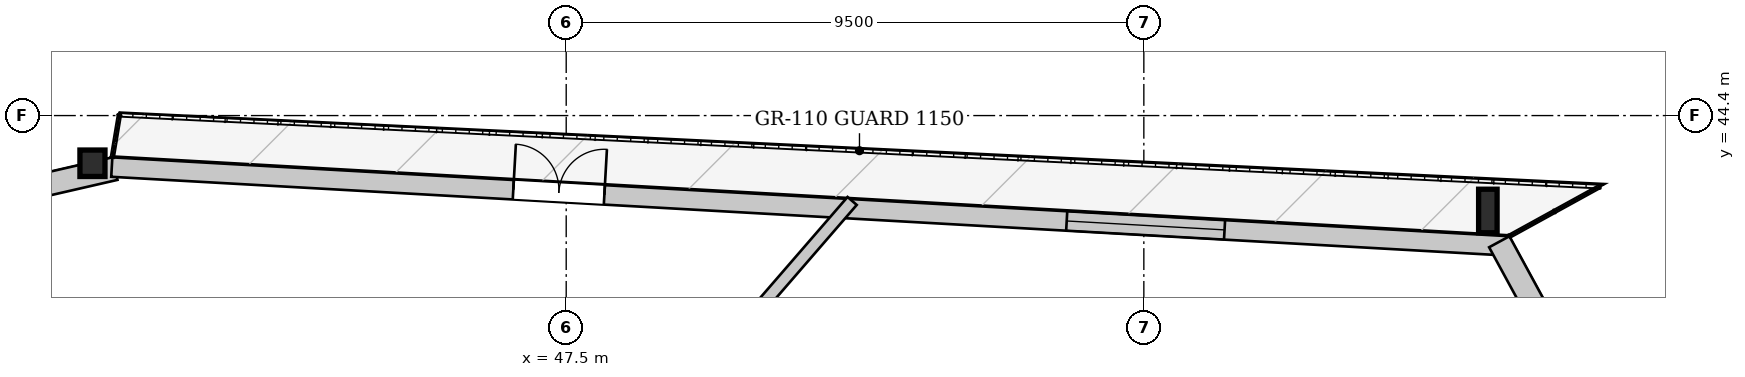
"""IFC4 building model, lengths in metres.
Left out: names, types, materials, properties, quantities, classifications, styles, units other than length and angle.
Written with IfcOpenShell. Run it as: python <this file> out.ifc"""

import sys

from ifc_helpers import new_model, si_unit, direction, frame, frame_2d, origin, origin_2d, place, context, subcontext, project, spatial, rectangle, i_section, extrude, source, transform, mapped, element, fill, save


model = new_model("IFC4")
c1 = context("Model", 3, precision=1e-05, world=origin(), true_north=direction((0.0, 1.0)))
c2 = subcontext(c1, "Body", "Model", "MODEL_VIEW")
j1 = project(units=[si_unit("LENGTHUNIT", "METRE"), si_unit("PLANEANGLEUNIT", "RADIAN")], contexts=[c1])
p1 = place(None, origin())
s1 = spatial("IfcSite", under=j1, at=p1, CompositionType="ELEMENT")
p2 = place(p1, origin())
s2 = spatial("IfcBuilding", under=s1, at=p2, CompositionType="ELEMENT")
p3 = place(p2, frame((0.0, 0.0, 157.25)))
s3 = spatial("IfcBuildingStorey", under=s2, at=p3, CompositionType="ELEMENT", Elevation=157.25)
m1 = source(origin(), c2, "Body", "SweptSolid", [
    extrude(i_section(OverallWidth=0.304, OverallDepth=0.716, WebThickness=0.021, FlangeThickness=0.04, at=origin_2d()), origin(), (0.0, 0.0, 1.0), 3.557),
])
p4 = place(p3, frame((63.012, 42.416, 0.0), z_axis=(-0.199467388464, 0.233444111551, 0.951691445649), x_axis=(-0.76026557105, -0.649612393259, 0.0)))
e1 = element("IfcColumn", 1, at=p4, inside=s3, PredefinedType="COLUMN", context=c2, shape_type="MappedRepresentation", body=[
    mapped(m1, transform((0.0, 0.0, 0.0), x_axis=(1.0, 0.0, 0.0), y_axis=(0.0, 1.0, 0.0), z_axis=(0.0, 0.0, 1.0), scale=1.0)),
])
m2 = source(origin(), c2, "Body", "SweptSolid", [
    extrude(i_section(OverallWidth=0.412, OverallDepth=0.435, WebThickness=0.031, FlangeThickness=0.05, at=origin_2d()), origin(), (0.0, 0.0, 1.0), 3.453),
])
p5 = place(p3, frame((40.035, 43.713, 0.0), z_axis=(-0.189343347232, -0.056209096733, 0.980300787668), x_axis=(0.284588007849, -0.958649918264, 0.0)))
e2 = element("IfcColumn", 2, at=p5, inside=s3, PredefinedType="COLUMN", context=c2, shape_type="MappedRepresentation", body=[
    mapped(m2, transform((0.0, 0.0, 0.0), x_axis=(1.0, 0.0, 0.0), y_axis=(0.0, 1.0, 0.0), z_axis=(0.0, 0.0, 1.0), scale=1.0)),
])
p6 = place(p3, frame((17.649, 38.375, 0.0), z_axis=(0.0, 0.0, 1.0), x_axis=(0.974613320318, 0.223894787475, 0.0)))
e3 = element("IfcWall", 3, at=p6, inside=s3, PredefinedType="SOLIDWALL", context=c2, shape_type="SweptSolid", body=[
    extrude(rectangle(XDim=23.013, YDim=0.38, at=frame_2d((11.507, 0.0))), origin(), (0.0, 0.0, 1.0), 2.722),
])
p7 = place(p6, frame((5.344, 0.0, 0.352)))
e4 = element("IfcOpeningElement", 4, at=p7, cuts=e3, PredefinedType="OPENING", context=c2, shape_type="SweptSolid", body=[
    extrude(rectangle(XDim=2.2, YDim=2.25, at=frame_2d((1.1, 1.125))), frame((0.0, 0.2, 0.0), z_axis=(0.0, -1.0, 0.0), x_axis=(1.0, 0.0, 0.0)), (0.0, 0.0, 1.0), 0.4),
])
p8 = place(p6, frame((15.47, 0.0, 0.352)))
e5 = element("IfcOpeningElement", 5, at=p8, cuts=e3, PredefinedType="OPENING", context=c2, shape_type="SweptSolid", body=[
    extrude(rectangle(XDim=2.2, YDim=2.25, at=frame_2d((1.1, 1.125))), frame((0.0, 0.2, 0.0), z_axis=(0.0, -1.0, 0.0), x_axis=(1.0, 0.0, 0.0)), (0.0, 0.0, 1.0), 0.4),
])
p9 = place(p3, frame((40.027, 43.553, 0.0), z_axis=(0.0, 0.0, 1.0), x_axis=(0.998410901797, -0.056353093731, 0.0)))
e6 = element("IfcWall", 6, at=p9, inside=s3, PredefinedType="SOLIDWALL", context=c2, shape_type="SweptSolid", body=[
    extrude(rectangle(XDim=23.013, YDim=0.32, at=frame_2d((11.507, 0.0))), origin(), (0.0, 0.0, 1.0), 2.722),
])
p10 = place(p9, frame((6.614, 0.0, 0.0)))
e7 = element("IfcOpeningElement", 7, at=p10, cuts=e6, PredefinedType="OPENING", context=c2, shape_type="SweptSolid", body=[
    extrude(rectangle(XDim=1.5, YDim=2.3, at=frame_2d((0.75, 1.15))), frame((0.0, 0.17, 0.0), z_axis=(0.0, -1.0, 0.0), x_axis=(1.0, 0.0, 0.0)), (0.0, 0.0, 1.0), 0.34),
])
p11 = place(p9, frame((15.73, 0.0, 0.252)))
e8 = element("IfcOpeningElement", 8, at=p11, cuts=e6, PredefinedType="OPENING", context=c2, shape_type="SweptSolid", body=[
    extrude(rectangle(XDim=2.6, YDim=2.35, at=frame_2d((1.3, 1.175))), frame((0.0, 0.17, 0.0), z_axis=(0.0, -1.0, 0.0), x_axis=(1.0, 0.0, 0.0)), (0.0, 0.0, 1.0), 0.34),
])
p12 = place(p3, frame((62.846, 42.325, 0.0), z_axis=(0.0, 0.0, 1.0), x_axis=(0.477924257252, -0.878401049823, 0.0)))
e9 = element("IfcWall", 9, at=p12, inside=s3, PredefinedType="SOLIDWALL", context=c2, shape_type="SweptSolid", body=[
    extrude(rectangle(XDim=3.559, YDim=0.38, at=frame_2d((1.78, 0.0))), origin(), (0.0, 0.0, 1.0), 2.722),
])
p13 = place(p3, frame((46.316, 36.2, 0.0), z_axis=(0.0, 0.0, 1.0), x_axis=(0.654736166115, 0.755857495022, 0.0)))
e10 = element("IfcWall", 10, at=p13, inside=s3, PredefinedType="PARTITIONING", context=c2, shape_type="SweptSolid", body=[
    extrude(rectangle(XDim=8.991, YDim=0.2, at=frame_2d((4.496, 0.0))), origin(), (0.0, 0.0, 1.0), 3.33),
])
m3 = source(origin(), c2, "Body", "SweptSolid", [
    extrude(rectangle(XDim=1.5, YDim=2.3, at=frame_2d((0.75, 1.15))), frame((0.0, 0.025, 0.0), z_axis=(0.0, -1.0, 0.0), x_axis=(1.0, 0.0, 0.0)), (0.0, 0.0, 1.0), 0.05),
])
p14 = place(p10, origin())
e11 = element("IfcDoor", 11, at=p14, inside=s3, OperationType="DOUBLE_DOOR_SINGLE_SWING", PredefinedType="DOOR", context=c2, shape_type="MappedRepresentation", body=[
    mapped(m3, transform((0.0, 0.0, 0.0), x_axis=(1.0, 0.0, 0.0), y_axis=(0.0, 1.0, 0.0), z_axis=(0.0, 0.0, 1.0), scale=1.0)),
])
fill(e7, e11)
m4 = source(origin(), c2, "Body", "SweptSolid", [
    extrude(rectangle(XDim=2.6, YDim=2.35, at=frame_2d((1.3, 1.175))), frame((0.0, 0.03, 0.0), z_axis=(0.0, -1.0, 0.0), x_axis=(1.0, 0.0, 0.0)), (0.0, 0.0, 1.0), 0.06),
])
p15 = place(p11, origin())
e12 = element("IfcWindow", 12, at=p15, inside=s3, PartitioningType="SINGLE_PANEL", PredefinedType="WINDOW", context=c2, shape_type="MappedRepresentation", body=[
    mapped(m4, transform((0.0, 0.0, 0.0), x_axis=(1.0, 0.0, 0.0), y_axis=(0.0, 1.0, 0.0), z_axis=(0.0, 0.0, 1.0), scale=1.0)),
])
fill(e8, e12)
save(model, sys.argv[1])
